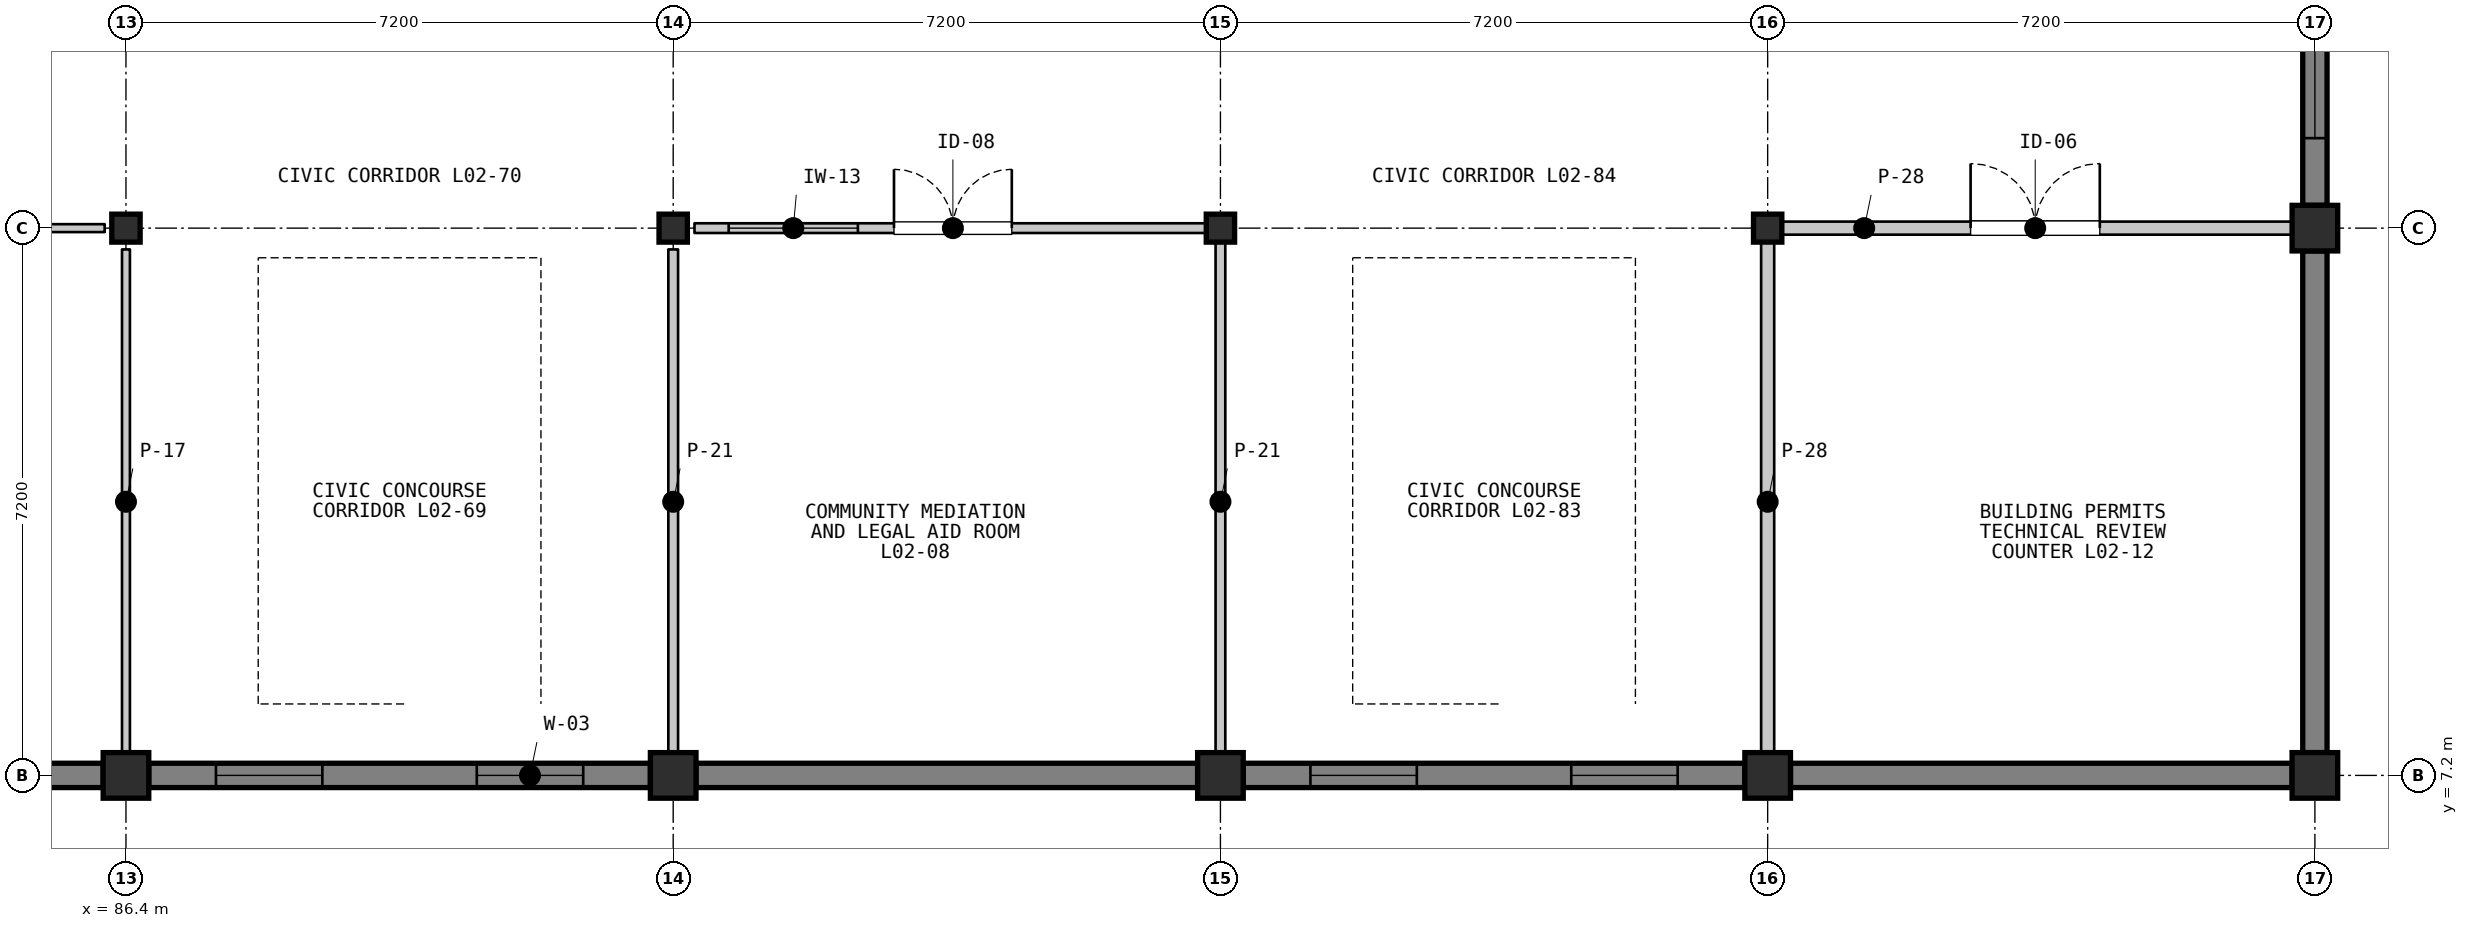
"""IFC4 building model, lengths in metres.
Left out: names, types, materials, properties, quantities, classifications, styles, units other than length and angle.
Written with IfcOpenShell. Run it as: python <this file> out.ifc"""

import sys

from ifc_helpers import new_model, si_unit, direction, frame, frame_2d, origin, origin_2d, place, context, subcontext, project, spatial, rectangle, i_section, extrude, element, fill, save


model = new_model("IFC4")
c1 = context("Model", 3, precision=1e-05, world=origin(), true_north=direction((0.0, 1.0)))
c2 = subcontext(c1, "Body", "Model", "MODEL_VIEW")
j1 = project(units=[si_unit("LENGTHUNIT", "METRE"), si_unit("PLANEANGLEUNIT", "RADIAN")], contexts=[c1])
p1 = place(None, origin())
s1 = spatial("IfcSite", under=j1, at=p1, CompositionType="ELEMENT")
p2 = place(p1, origin())
s2 = spatial("IfcBuilding", under=s1, at=p2, CompositionType="ELEMENT")
p3 = place(p2, frame((0.0, 0.0, 5.4)))
s3 = spatial("IfcBuildingStorey", under=s2, at=p3, CompositionType="ELEMENT", Elevation=5.4)
p4 = place(p3, frame((86.4, 7.2, 0.0), z_axis=(0.0, 0.0, 1.0), x_axis=(1.0, 0.0, 0.0)))
e1 = element("IfcColumn", 1, at=p4, inside=s3, PredefinedType="COLUMN", context=c2, shape_type="SweptSolid", body=[
    extrude(rectangle(XDim=0.6, YDim=0.6, at=origin_2d()), origin(), (0.0, 0.0, 1.0), 4.5),
])
p5 = place(p3, frame((86.4, 14.4, 0.0), z_axis=(0.0, 0.0, 1.0), x_axis=(1.0, 0.0, 0.0)))
e2 = element("IfcColumn", 2, at=p5, inside=s3, PredefinedType="COLUMN", context=c2, shape_type="SweptSolid", body=[
    extrude(i_section(OverallWidth=0.373, OverallDepth=0.368, WebThickness=0.015, FlangeThickness=0.024, FilletRadius=0.015, at=origin_2d()), origin(), (0.0, 0.0, 1.0), 4.5),
])
p6 = place(p3, frame((93.6, 7.2, 0.0), z_axis=(0.0, 0.0, 1.0), x_axis=(1.0, 0.0, 0.0)))
e3 = element("IfcColumn", 3, at=p6, inside=s3, PredefinedType="COLUMN", context=c2, shape_type="SweptSolid", body=[
    extrude(rectangle(XDim=0.6, YDim=0.6, at=origin_2d()), origin(), (0.0, 0.0, 1.0), 4.5),
])
p7 = place(p3, frame((93.6, 14.4, 0.0), z_axis=(0.0, 0.0, 1.0), x_axis=(1.0, 0.0, 0.0)))
e4 = element("IfcColumn", 4, at=p7, inside=s3, PredefinedType="COLUMN", context=c2, shape_type="SweptSolid", body=[
    extrude(i_section(OverallWidth=0.373, OverallDepth=0.368, WebThickness=0.015, FlangeThickness=0.024, FilletRadius=0.015, at=origin_2d()), origin(), (0.0, 0.0, 1.0), 4.5),
])
p8 = place(p3, frame((100.8, 7.2, 0.0), z_axis=(0.0, 0.0, 1.0), x_axis=(1.0, 0.0, 0.0)))
e5 = element("IfcColumn", 5, at=p8, inside=s3, PredefinedType="COLUMN", context=c2, shape_type="SweptSolid", body=[
    extrude(rectangle(XDim=0.6, YDim=0.6, at=origin_2d()), origin(), (0.0, 0.0, 1.0), 4.5),
])
p9 = place(p3, frame((100.8, 14.4, 0.0), z_axis=(0.0, 0.0, 1.0), x_axis=(1.0, 0.0, 0.0)))
e6 = element("IfcColumn", 6, at=p9, inside=s3, PredefinedType="COLUMN", context=c2, shape_type="SweptSolid", body=[
    extrude(i_section(OverallWidth=0.373, OverallDepth=0.368, WebThickness=0.015, FlangeThickness=0.024, FilletRadius=0.015, at=origin_2d()), origin(), (0.0, 0.0, 1.0), 4.5),
])
p10 = place(p3, frame((108.0, 7.2, 0.0), z_axis=(0.0, 0.0, 1.0), x_axis=(1.0, 0.0, 0.0)))
e7 = element("IfcColumn", 7, at=p10, inside=s3, PredefinedType="COLUMN", context=c2, shape_type="SweptSolid", body=[
    extrude(rectangle(XDim=0.6, YDim=0.6, at=origin_2d()), origin(), (0.0, 0.0, 1.0), 4.5),
])
p11 = place(p3, frame((108.0, 14.4, 0.0), z_axis=(0.0, 0.0, 1.0), x_axis=(1.0, 0.0, 0.0)))
e8 = element("IfcColumn", 8, at=p11, inside=s3, PredefinedType="COLUMN", context=c2, shape_type="SweptSolid", body=[
    extrude(i_section(OverallWidth=0.373, OverallDepth=0.368, WebThickness=0.015, FlangeThickness=0.024, FilletRadius=0.015, at=origin_2d()), origin(), (0.0, 0.0, 1.0), 4.5),
])
for number, where, z_axis, x_axis in (
    (9, (115.2, 7.2, 0.0), (0.0, 0.0, 1.0), (1.0, 0.0, 0.0)),
    (10, (115.2, 14.4, 0.0), (0.0, 0.0, 1.0), (1.0, 0.0, 0.0)),
):
    element("IfcColumn", number, at=place(p3, frame(where, z_axis=z_axis, x_axis=x_axis)), inside=s3, PredefinedType="COLUMN", context=c2, shape_type="SweptSolid", body=[
        extrude(rectangle(XDim=0.6, YDim=0.6, at=origin_2d()), origin(), (0.0, 0.0, 1.0), 4.5),
    ])
p12 = place(p3, frame((86.1, 7.2, 0.0), z_axis=(0.0, 0.0, 1.0), x_axis=(-1.0, 0.0, 0.0)))
e11 = element("IfcWall", 11, at=p12, inside=s3, PredefinedType="SOLIDWALL", context=c2, shape_type="SweptSolid", body=[
    extrude(rectangle(XDim=6.6, YDim=0.32, at=frame_2d((3.3, 0.0))), origin(), (0.0, 0.0, 1.0), 3.698),
])
p13 = place(p3, frame((93.3, 7.2, 0.0), z_axis=(0.0, 0.0, 1.0), x_axis=(-1.0, 0.0, 0.0)))
e12 = element("IfcWall", 12, at=p13, inside=s3, PredefinedType="SOLIDWALL", context=c2, shape_type="SweptSolid", body=[
    extrude(rectangle(XDim=6.6, YDim=0.32, at=frame_2d((3.3, 0.0))), origin(), (0.0, 0.0, 1.0), 3.698),
])
p14 = place(p13, frame((0.884, 0.0, 0.95)))
e13 = element("IfcOpeningElement", 13, at=p14, cuts=e12, PredefinedType="OPENING", context=c2, shape_type="SweptSolid", body=[
    extrude(rectangle(XDim=1.4, YDim=2.1, at=frame_2d((0.7, 1.05))), frame((0.0, 0.17, 0.0), z_axis=(0.0, -1.0, 0.0), x_axis=(1.0, 0.0, 0.0)), (0.0, 0.0, 1.0), 0.34),
])
p15 = place(p13, frame((4.316, 0.0, 0.95)))
e14 = element("IfcOpeningElement", 14, at=p15, cuts=e12, PredefinedType="OPENING", context=c2, shape_type="SweptSolid", body=[
    extrude(rectangle(XDim=1.4, YDim=2.1, at=frame_2d((0.7, 1.05))), frame((0.0, 0.17, 0.0), z_axis=(0.0, -1.0, 0.0), x_axis=(1.0, 0.0, 0.0)), (0.0, 0.0, 1.0), 0.34),
])
p16 = place(p3, frame((100.5, 7.2, 0.0), z_axis=(0.0, 0.0, 1.0), x_axis=(-1.0, 0.0, 0.0)))
e15 = element("IfcWall", 15, at=p16, inside=s3, PredefinedType="SOLIDWALL", context=c2, shape_type="SweptSolid", body=[
    extrude(rectangle(XDim=6.6, YDim=0.32, at=frame_2d((3.3, 0.0))), origin(), (0.0, 0.0, 1.0), 3.698),
])
p17 = place(p3, frame((107.7, 7.2, 0.0), z_axis=(0.0, 0.0, 1.0), x_axis=(-1.0, 0.0, 0.0)))
e16 = element("IfcWall", 16, at=p17, inside=s3, PredefinedType="SOLIDWALL", context=c2, shape_type="SweptSolid", body=[
    extrude(rectangle(XDim=6.6, YDim=0.32, at=frame_2d((3.3, 0.0))), origin(), (0.0, 0.0, 1.0), 3.698),
])
p18 = place(p17, frame((0.884, 0.0, 0.95)))
e17 = element("IfcOpeningElement", 17, at=p18, cuts=e16, PredefinedType="OPENING", context=c2, shape_type="SweptSolid", body=[
    extrude(rectangle(XDim=1.4, YDim=2.1, at=frame_2d((0.7, 1.05))), frame((0.0, 0.17, 0.0), z_axis=(0.0, -1.0, 0.0), x_axis=(1.0, 0.0, 0.0)), (0.0, 0.0, 1.0), 0.34),
])
p19 = place(p17, frame((4.316, 0.0, 0.95)))
e18 = element("IfcOpeningElement", 18, at=p19, cuts=e16, PredefinedType="OPENING", context=c2, shape_type="SweptSolid", body=[
    extrude(rectangle(XDim=1.4, YDim=2.1, at=frame_2d((0.7, 1.05))), frame((0.0, 0.17, 0.0), z_axis=(0.0, -1.0, 0.0), x_axis=(1.0, 0.0, 0.0)), (0.0, 0.0, 1.0), 0.34),
])
p20 = place(p3, frame((114.9, 7.2, 0.0), z_axis=(0.0, 0.0, 1.0), x_axis=(-1.0, 0.0, 0.0)))
e19 = element("IfcWall", 19, at=p20, inside=s3, PredefinedType="SOLIDWALL", context=c2, shape_type="SweptSolid", body=[
    extrude(rectangle(XDim=6.6, YDim=0.32, at=frame_2d((3.3, 0.0))), origin(), (0.0, 0.0, 1.0), 3.698),
])
p21 = place(p3, frame((115.2, 14.1, 0.0), z_axis=(0.0, 0.0, 1.0), x_axis=(0.0, -1.0, 0.0)))
e20 = element("IfcWall", 20, at=p21, inside=s3, PredefinedType="SOLIDWALL", context=c2, shape_type="SweptSolid", body=[
    extrude(rectangle(XDim=6.6, YDim=0.32, at=frame_2d((3.3, 0.0))), origin(), (0.0, 0.0, 1.0), 3.767),
])
p22 = place(p3, frame((115.2, 21.3, 0.0), z_axis=(0.0, 0.0, 1.0), x_axis=(0.0, -1.0, 0.0)))
e21 = element("IfcWall", 21, at=p22, inside=s3, PredefinedType="SOLIDWALL", context=c2, shape_type="SweptSolid", body=[
    extrude(rectangle(XDim=6.6, YDim=0.32, at=frame_2d((3.3, 0.0))), origin(), (0.0, 0.0, 1.0), 3.767),
])
p23 = place(p22, frame((0.884, 0.0, 0.95)))
e22 = element("IfcOpeningElement", 22, at=p23, cuts=e21, PredefinedType="OPENING", context=c2, shape_type="SweptSolid", body=[
    extrude(rectangle(XDim=1.4, YDim=2.1, at=frame_2d((0.7, 1.05))), frame((0.0, 0.17, 0.0), z_axis=(0.0, -1.0, 0.0), x_axis=(1.0, 0.0, 0.0)), (0.0, 0.0, 1.0), 0.34),
])
p24 = place(p22, frame((4.316, 0.0, 0.95)))
e23 = element("IfcOpeningElement", 23, at=p24, cuts=e21, PredefinedType="OPENING", context=c2, shape_type="SweptSolid", body=[
    extrude(rectangle(XDim=1.4, YDim=2.1, at=frame_2d((0.7, 1.05))), frame((0.0, 0.17, 0.0), z_axis=(0.0, -1.0, 0.0), x_axis=(1.0, 0.0, 0.0)), (0.0, 0.0, 1.0), 0.34),
])
p25 = place(p3, frame((79.48, 14.4, 0.0), z_axis=(0.0, 0.0, 1.0), x_axis=(1.0, 0.0, 0.0)))
e24 = element("IfcWall", 24, at=p25, inside=s3, PredefinedType="PARTITIONING", context=c2, shape_type="SweptSolid", body=[
    extrude(rectangle(XDim=6.64, YDim=0.104, at=frame_2d((3.32, 0.0))), origin(), (0.0, 0.0, 1.0), 3.688),
])
p26 = place(p25, frame((2.37, 0.0, 0.0)))
e25 = element("IfcOpeningElement", 25, at=p26, cuts=e24, PredefinedType="OPENING", context=c2, shape_type="SweptSolid", body=[
    extrude(rectangle(XDim=1.9, YDim=2.45, at=frame_2d((0.95, 1.225))), frame((0.0, 0.062, 0.0), z_axis=(0.0, -1.0, 0.0), x_axis=(1.0, 0.0, 0.0)), (0.0, 0.0, 1.0), 0.124),
])
p27 = place(p25, frame((0.45, 0.0, 1.05)))
e26 = element("IfcOpeningElement", 26, at=p27, cuts=e24, PredefinedType="OPENING", context=c2, shape_type="SweptSolid", body=[
    extrude(rectangle(XDim=1.45, YDim=1.15, at=frame_2d((0.725, 0.575))), frame((0.0, 0.062, 0.0), z_axis=(0.0, -1.0, 0.0), x_axis=(1.0, 0.0, 0.0)), (0.0, 0.0, 1.0), 0.124),
])
p28 = place(p3, frame((86.4, 14.12, 0.0), z_axis=(0.0, 0.0, 1.0), x_axis=(0.0, -1.0, 0.0)))
e27 = element("IfcWall", 27, at=p28, inside=s3, PredefinedType="PARTITIONING", context=c2, shape_type="SweptSolid", body=[
    extrude(rectangle(XDim=6.64, YDim=0.104, at=frame_2d((3.32, 0.0))), origin(), (0.0, 0.0, 1.0), 3.757),
])
p29 = place(p3, frame((93.88, 14.4, 0.0), z_axis=(0.0, 0.0, 1.0), x_axis=(1.0, 0.0, 0.0)))
e28 = element("IfcWall", 28, at=p29, inside=s3, PredefinedType="PARTITIONING", context=c2, shape_type="SweptSolid", body=[
    extrude(rectangle(XDim=6.8, YDim=0.128, at=frame_2d((3.4, 0.0))), origin(), (0.0, 0.0, 1.0), 3.688),
])
p30 = place(p29, frame((2.625, 0.0, 0.0)))
e29 = element("IfcOpeningElement", 29, at=p30, cuts=e28, PredefinedType="OPENING", context=c2, shape_type="SweptSolid", body=[
    extrude(rectangle(XDim=1.55, YDim=2.3, at=frame_2d((0.775, 1.15))), frame((0.0, 0.074, 0.0), z_axis=(0.0, -1.0, 0.0), x_axis=(1.0, 0.0, 0.0)), (0.0, 0.0, 1.0), 0.148),
])
p31 = place(p29, frame((0.45, 0.0, 1.05)))
e30 = element("IfcOpeningElement", 30, at=p31, cuts=e28, PredefinedType="OPENING", context=c2, shape_type="SweptSolid", body=[
    extrude(rectangle(XDim=1.7, YDim=1.18, at=frame_2d((0.85, 0.59))), frame((0.0, 0.074, 0.0), z_axis=(0.0, -1.0, 0.0), x_axis=(1.0, 0.0, 0.0)), (0.0, 0.0, 1.0), 0.148),
])
p32 = place(p3, frame((93.6, 7.48, 0.0), z_axis=(0.0, 0.0, 1.0), x_axis=(0.0, 1.0, 0.0)))
e31 = element("IfcWall", 31, at=p32, inside=s3, PredefinedType="PARTITIONING", context=c2, shape_type="SweptSolid", body=[
    extrude(rectangle(XDim=6.64, YDim=0.128, at=frame_2d((3.32, 0.0))), origin(), (0.0, 0.0, 1.0), 3.757),
])
p33 = place(p3, frame((100.8, 14.28, 0.0), z_axis=(0.0, 0.0, 1.0), x_axis=(0.0, -1.0, 0.0)))
e32 = element("IfcWall", 32, at=p33, inside=s3, PredefinedType="PARTITIONING", context=c2, shape_type="SweptSolid", body=[
    extrude(rectangle(XDim=6.96, YDim=0.128, at=frame_2d((3.48, 0.0))), origin(), (0.0, 0.0, 1.0), 3.688),
])
p34 = place(p3, frame((108.12, 14.4, 0.0), z_axis=(0.0, 0.0, 1.0), x_axis=(1.0, 0.0, 0.0)))
e33 = element("IfcWall", 33, at=p34, inside=s3, PredefinedType="PARTITIONING", context=c2, shape_type="SweptSolid", body=[
    extrude(rectangle(XDim=6.8, YDim=0.172, at=frame_2d((3.4, 0.0))), origin(), (0.0, 0.0, 1.0), 3.688),
])
p35 = place(p34, frame((2.55, 0.0, 0.0)))
e34 = element("IfcOpeningElement", 34, at=p35, cuts=e33, PredefinedType="OPENING", context=c2, shape_type="SweptSolid", body=[
    extrude(rectangle(XDim=1.7, YDim=2.35, at=frame_2d((0.85, 1.175))), frame((0.0, 0.096, 0.0), z_axis=(0.0, -1.0, 0.0), x_axis=(1.0, 0.0, 0.0)), (0.0, 0.0, 1.0), 0.192),
])
p36 = place(p3, frame((108.0, 7.32, 0.0), z_axis=(0.0, 0.0, 1.0), x_axis=(0.0, 1.0, 0.0)))
e35 = element("IfcWall", 35, at=p36, inside=s3, PredefinedType="PARTITIONING", context=c2, shape_type="SweptSolid", body=[
    extrude(rectangle(XDim=6.96, YDim=0.172, at=frame_2d((3.48, 0.0))), origin(), (0.0, 0.0, 1.0), 3.688),
])
p37 = place(p14, origin())
e36 = element("IfcWindow", 36, at=p37, inside=s3, PartitioningType="SINGLE_PANEL", PredefinedType="WINDOW", context=c2, shape_type="SweptSolid", body=[
    extrude(rectangle(XDim=1.4, YDim=2.1, at=frame_2d((0.7, 1.05))), frame((0.0, 0.03, 0.0), z_axis=(0.0, -1.0, 0.0), x_axis=(1.0, 0.0, 0.0)), (0.0, 0.0, 1.0), 0.06),
])
fill(e13, e36)
p38 = place(p15, origin())
e37 = element("IfcWindow", 37, at=p38, inside=s3, PartitioningType="SINGLE_PANEL", PredefinedType="WINDOW", context=c2, shape_type="SweptSolid", body=[
    extrude(rectangle(XDim=1.4, YDim=2.1, at=frame_2d((0.7, 1.05))), frame((0.0, 0.03, 0.0), z_axis=(0.0, -1.0, 0.0), x_axis=(1.0, 0.0, 0.0)), (0.0, 0.0, 1.0), 0.06),
])
fill(e14, e37)
p39 = place(p18, origin())
e38 = element("IfcWindow", 38, at=p39, inside=s3, PartitioningType="SINGLE_PANEL", PredefinedType="WINDOW", context=c2, shape_type="SweptSolid", body=[
    extrude(rectangle(XDim=1.4, YDim=2.1, at=frame_2d((0.7, 1.05))), frame((0.0, 0.03, 0.0), z_axis=(0.0, -1.0, 0.0), x_axis=(1.0, 0.0, 0.0)), (0.0, 0.0, 1.0), 0.06),
])
fill(e17, e38)
p40 = place(p19, origin())
e39 = element("IfcWindow", 39, at=p40, inside=s3, PartitioningType="SINGLE_PANEL", PredefinedType="WINDOW", context=c2, shape_type="SweptSolid", body=[
    extrude(rectangle(XDim=1.4, YDim=2.1, at=frame_2d((0.7, 1.05))), frame((0.0, 0.03, 0.0), z_axis=(0.0, -1.0, 0.0), x_axis=(1.0, 0.0, 0.0)), (0.0, 0.0, 1.0), 0.06),
])
fill(e18, e39)
p41 = place(p24, origin())
e40 = element("IfcWindow", 40, at=p41, inside=s3, PartitioningType="SINGLE_PANEL", PredefinedType="WINDOW", context=c2, shape_type="SweptSolid", body=[
    extrude(rectangle(XDim=1.4, YDim=2.1, at=frame_2d((0.7, 1.05))), frame((0.0, 0.03, 0.0), z_axis=(0.0, -1.0, 0.0), x_axis=(1.0, 0.0, 0.0)), (0.0, 0.0, 1.0), 0.06),
])
fill(e23, e40)
p42 = place(p30, origin())
e41 = element("IfcDoor", 41, at=p42, inside=s3, OperationType="DOUBLE_DOOR_SINGLE_SWING", PredefinedType="DOOR", context=c2, shape_type="SweptSolid", body=[
    extrude(rectangle(XDim=1.55, YDim=2.3, at=frame_2d((0.775, 1.15))), frame((0.0, 0.025, 0.0), z_axis=(0.0, -1.0, 0.0), x_axis=(1.0, 0.0, 0.0)), (0.0, 0.0, 1.0), 0.05),
])
fill(e29, e41)
p43 = place(p31, origin())
e42 = element("IfcWindow", 42, at=p43, inside=s3, PartitioningType="SINGLE_PANEL", PredefinedType="WINDOW", context=c2, shape_type="SweptSolid", body=[
    extrude(rectangle(XDim=1.7, YDim=1.18, at=frame_2d((0.85, 0.59))), frame((0.0, 0.03, 0.0), z_axis=(0.0, -1.0, 0.0), x_axis=(1.0, 0.0, 0.0)), (0.0, 0.0, 1.0), 0.06),
])
fill(e30, e42)
p44 = place(p35, origin())
e43 = element("IfcDoor", 43, at=p44, inside=s3, OperationType="DOUBLE_DOOR_SINGLE_SWING", PredefinedType="DOOR", context=c2, shape_type="SweptSolid", body=[
    extrude(rectangle(XDim=1.7, YDim=2.35, at=frame_2d((0.85, 1.175))), frame((0.0, 0.025, 0.0), z_axis=(0.0, -1.0, 0.0), x_axis=(1.0, 0.0, 0.0)), (0.0, 0.0, 1.0), 0.05),
])
fill(e34, e43)
save(model, sys.argv[1])
